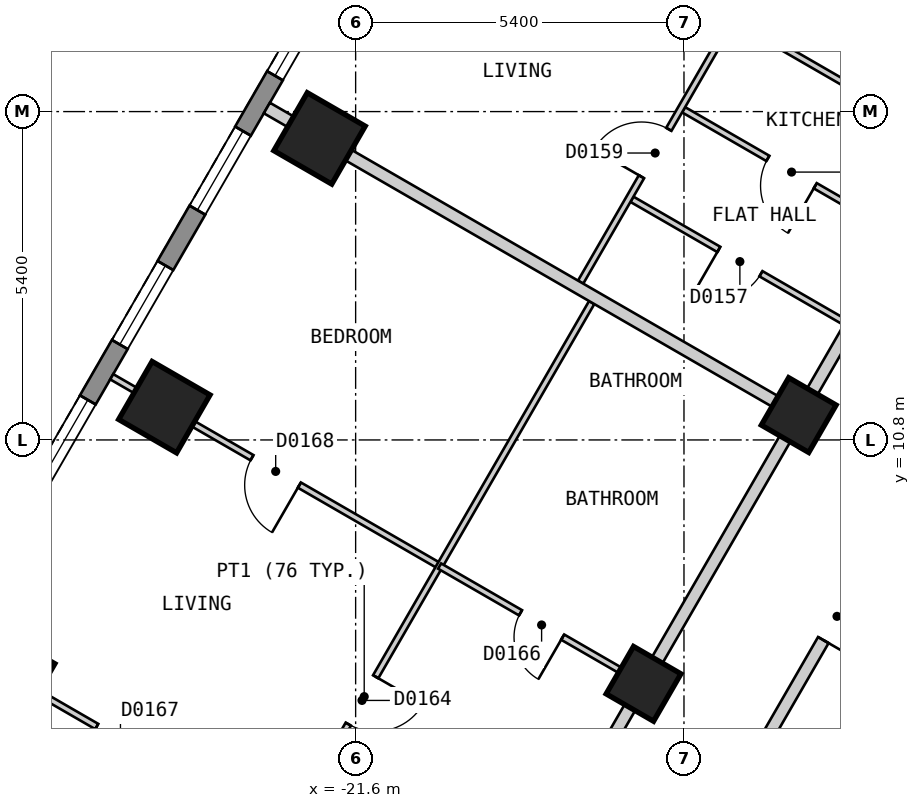
"""IFC4 building model, lengths in metres.
Left out: names, types, materials, properties, quantities, classifications, styles, units other than length and angle.
Written with IfcOpenShell. Run it as: python <this file> out.ifc"""

import sys

from ifc_helpers import new_model, si_unit, direction, frame, frame_2d, origin, origin_2d, place, context, subcontext, project, spatial, polyline, rectangle, outline, extrude, element, fill, save


model = new_model("IFC4")
c1 = context("Model", 3, precision=1e-05, world=origin(), true_north=direction((0.0, 1.0)))
c2 = subcontext(c1, "Body", "Model", "MODEL_VIEW")
j1 = project(units=[si_unit("LENGTHUNIT", "METRE"), si_unit("PLANEANGLEUNIT", "RADIAN")], contexts=[c1])
p1 = place(None, origin())
s1 = spatial("IfcSite", under=j1, at=p1, CompositionType="ELEMENT")
p2 = place(p1, origin())
s2 = spatial("IfcBuilding", under=s1, at=p2, CompositionType="ELEMENT")
p3 = place(p2, frame((0.0, 0.0, 23.4)))
s3 = spatial("IfcBuildingStorey", under=s2, at=p3, CompositionType="ELEMENT", Elevation=23.4)
for number, where, z_axis, x_axis in (
    (1, (-22.194, 15.759, 0.0), (0.0, 0.0, 1.0), (-0.5, -0.866, 0.0)),
    (2, (-24.746, 11.339, 0.0), (0.0, 0.0, 1.0), (-0.5, -0.866, 0.0)),
    (3, (-27.298, 6.919, 0.0), (0.0, 0.0, 1.0), (-0.5, -0.866, 0.0)),
):
    element("IfcColumn", number, at=place(p3, frame(where, z_axis=z_axis, x_axis=x_axis)), inside=s3, PredefinedType="COLUMN", context=c2, shape_type="SweptSolid", body=[
        extrude(rectangle(XDim=1.1, YDim=1.1, at=origin_2d()), origin(), (0.0, 0.0, 1.0), 3.0),
    ])
for number, where, z_axis, x_axis in (
    (4, (-14.313, 11.209, 0.0), (0.0, 0.0, 1.0), (-0.5, -0.866, 0.0)),
    (5, (-16.865, 6.789, 0.0), (0.0, 0.0, 1.0), (-0.5, -0.866, 0.0)),
):
    element("IfcColumn", number, at=place(p3, frame(where, z_axis=z_axis, x_axis=x_axis)), inside=s3, PredefinedType="COLUMN", context=c2, shape_type="SweptSolid", body=[
        extrude(rectangle(XDim=0.9, YDim=0.9, at=origin_2d()), origin(), (0.0, 0.0, 1.0), 3.0),
    ])
p4 = place(p3, frame((-17.71, 25.825, 0.0), z_axis=(0.0, 0.0, 1.0), x_axis=(-0.500001938803, -0.866024284413, 0.0)))
e6 = element("IfcWall", 6, at=p4, inside=s3, PredefinedType="SOLIDWALL", context=c2, shape_type="SweptSolid", body=[
    extrude(outline(polyline([(0.0, -0.15), (27.02, -0.15), (26.94, 0.15), (0.08, 0.15), (0.0, -0.15)])), origin(), (0.0, 0.0, 1.0), 2.7),
])
p5 = place(p4, frame((1.277, 0.0, 0.15)))
e7 = element("IfcOpeningElement", 7, at=p5, cuts=e6, PredefinedType="OPENING", context=c2, shape_type="SweptSolid", body=[
    extrude(rectangle(XDim=1.5, YDim=2.1, at=frame_2d((0.75, 1.05))), frame((0.0, 0.16, 0.0), z_axis=(0.0, -1.0, 0.0), x_axis=(1.0, 0.0, 0.0)), (0.0, 0.0, 1.0), 0.32),
])
p6 = place(p4, frame((3.829, 0.0, 0.15)))
e8 = element("IfcOpeningElement", 8, at=p6, cuts=e6, PredefinedType="OPENING", context=c2, shape_type="SweptSolid", body=[
    extrude(rectangle(XDim=1.5, YDim=2.1, at=frame_2d((0.75, 1.05))), frame((0.0, 0.16, 0.0), z_axis=(0.0, -1.0, 0.0), x_axis=(1.0, 0.0, 0.0)), (0.0, 0.0, 1.0), 0.32),
])
p7 = place(p4, frame((6.382, 0.0, 0.15)))
e9 = element("IfcOpeningElement", 9, at=p7, cuts=e6, PredefinedType="OPENING", context=c2, shape_type="SweptSolid", body=[
    extrude(rectangle(XDim=1.5, YDim=2.1, at=frame_2d((0.75, 1.05))), frame((0.0, 0.16, 0.0), z_axis=(0.0, -1.0, 0.0), x_axis=(1.0, 0.0, 0.0)), (0.0, 0.0, 1.0), 0.32),
])
p8 = place(p4, frame((8.933, 0.0, 0.15)))
e10 = element("IfcOpeningElement", 10, at=p8, cuts=e6, PredefinedType="OPENING", context=c2, shape_type="SweptSolid", body=[
    extrude(rectangle(XDim=1.5, YDim=2.1, at=frame_2d((0.75, 1.05))), frame((0.0, 0.16, 0.0), z_axis=(0.0, -1.0, 0.0), x_axis=(1.0, 0.0, 0.0)), (0.0, 0.0, 1.0), 0.32),
])
p9 = place(p4, frame((11.485, 0.0, 0.15)))
e11 = element("IfcOpeningElement", 11, at=p9, cuts=e6, PredefinedType="OPENING", context=c2, shape_type="SweptSolid", body=[
    extrude(rectangle(XDim=1.5, YDim=2.1, at=frame_2d((0.75, 1.05))), frame((0.0, 0.16, 0.0), z_axis=(0.0, -1.0, 0.0), x_axis=(1.0, 0.0, 0.0)), (0.0, 0.0, 1.0), 0.32),
])
p10 = place(p4, frame((14.037, 0.0, 0.15)))
e12 = element("IfcOpeningElement", 12, at=p10, cuts=e6, PredefinedType="OPENING", context=c2, shape_type="SweptSolid", body=[
    extrude(rectangle(XDim=1.5, YDim=2.1, at=frame_2d((0.75, 1.05))), frame((0.0, 0.16, 0.0), z_axis=(0.0, -1.0, 0.0), x_axis=(1.0, 0.0, 0.0)), (0.0, 0.0, 1.0), 0.32),
])
p11 = place(p4, frame((16.589, 0.0, 0.15)))
e13 = element("IfcOpeningElement", 13, at=p11, cuts=e6, PredefinedType="OPENING", context=c2, shape_type="SweptSolid", body=[
    extrude(rectangle(XDim=1.5, YDim=2.1, at=frame_2d((0.75, 1.05))), frame((0.0, 0.16, 0.0), z_axis=(0.0, -1.0, 0.0), x_axis=(1.0, 0.0, 0.0)), (0.0, 0.0, 1.0), 0.32),
])
p12 = place(p4, frame((19.141, 0.0, 0.15)))
e14 = element("IfcOpeningElement", 14, at=p12, cuts=e6, PredefinedType="OPENING", context=c2, shape_type="SweptSolid", body=[
    extrude(rectangle(XDim=1.5, YDim=2.1, at=frame_2d((0.75, 1.05))), frame((0.0, 0.16, 0.0), z_axis=(0.0, -1.0, 0.0), x_axis=(1.0, 0.0, 0.0)), (0.0, 0.0, 1.0), 0.32),
])
p13 = place(p4, frame((21.693, 0.0, 0.15)))
e15 = element("IfcOpeningElement", 15, at=p13, cuts=e6, PredefinedType="OPENING", context=c2, shape_type="SweptSolid", body=[
    extrude(rectangle(XDim=1.5, YDim=2.1, at=frame_2d((0.75, 1.05))), frame((0.0, 0.16, 0.0), z_axis=(0.0, -1.0, 0.0), x_axis=(1.0, 0.0, 0.0)), (0.0, 0.0, 1.0), 0.32),
])
p14 = place(p4, frame((24.244, 0.0, 0.15)))
e16 = element("IfcOpeningElement", 16, at=p14, cuts=e6, PredefinedType="OPENING", context=c2, shape_type="SweptSolid", body=[
    extrude(rectangle(XDim=1.5, YDim=2.1, at=frame_2d((0.75, 1.05))), frame((0.0, 0.16, 0.0), z_axis=(0.0, -1.0, 0.0), x_axis=(1.0, 0.0, 0.0)), (0.0, 0.0, 1.0), 0.32),
])
p15 = place(p3, frame((-18.244, -0.001, 0.0), z_axis=(0.0, 0.0, 1.0), x_axis=(0.499962999376, 0.866046765051, 0.0)))
e17 = element("IfcWall", 17, at=p15, inside=s3, PredefinedType="PARTITIONING", context=c2, shape_type="SweptSolid", body=[
    extrude(rectangle(XDim=18.245, YDim=0.2, at=frame_2d((9.123, 0.0))), origin(), (0.0, 0.0, 1.0), 2.7),
])
p16 = place(p15, frame((8.672, 0.0, 0.0)))
e18 = element("IfcOpeningElement", 18, at=p16, cuts=e17, PredefinedType="OPENING", context=c2, shape_type="SweptSolid", body=[
    extrude(rectangle(XDim=0.9, YDim=2.1, at=frame_2d((0.45, 1.05))), frame((0.0, 0.11, 0.0), z_axis=(0.0, -1.0, 0.0), x_axis=(1.0, 0.0, 0.0)), (0.0, 0.0, 1.0), 0.22),
])
p17 = place(p3, frame((-20.727, 0.099, 0.0), z_axis=(0.0, 0.0, 1.0), x_axis=(0.499993204491, 0.866029327138, 0.0)))
e19 = element("IfcWall", 19, at=p17, inside=s3, PredefinedType="PARTITIONING", context=c2, shape_type="SweptSolid", body=[
    extrude(rectangle(XDim=20.554, YDim=0.2, at=frame_2d((10.277, 0.0))), origin(), (0.0, 0.0, 1.0), 2.7),
])
p18 = place(p17, frame((14.88, 0.0, 0.0)))
e20 = element("IfcOpeningElement", 20, at=p18, cuts=e19, PredefinedType="OPENING", context=c2, shape_type="SweptSolid", body=[
    extrude(rectangle(XDim=1.0, YDim=2.1, at=frame_2d((0.5, 1.05))), frame((0.0, 0.11, 0.0), z_axis=(0.0, -1.0, 0.0), x_axis=(1.0, 0.0, 0.0)), (0.0, 0.0, 1.0), 0.22),
])
p19 = place(p17, frame((4.673, 0.0, 0.0)))
e21 = element("IfcOpeningElement", 21, at=p19, cuts=e19, PredefinedType="OPENING", context=c2, shape_type="SweptSolid", body=[
    extrude(rectangle(XDim=1.0, YDim=2.1, at=frame_2d((0.5, 1.05))), frame((0.0, 0.11, 0.0), z_axis=(0.0, -1.0, 0.0), x_axis=(1.0, 0.0, 0.0)), (0.0, 0.0, 1.0), 0.22),
])
p20 = place(p3, frame((-28.164, 7.419, 0.0), z_axis=(0.0, 0.0, 1.0), x_axis=(0.86607068519, -0.499921562103, 0.0)))
e22 = element("IfcWall", 22, at=p20, inside=s3, PredefinedType="PARTITIONING", context=c2, shape_type="SweptSolid", body=[
    extrude(rectangle(XDim=6.227, YDim=0.1, at=frame_2d((3.114, 0.0))), origin(), (0.0, 0.0, 1.0), 2.7),
])
p21 = place(p20, frame((2.663, 0.0, 0.0)))
e23 = element("IfcOpeningElement", 23, at=p21, cuts=e22, PredefinedType="OPENING", context=c2, shape_type="SweptSolid", body=[
    extrude(rectangle(XDim=0.9, YDim=2.1, at=frame_2d((0.45, 1.05))), frame((0.0, 0.06, 0.0), z_axis=(0.0, -1.0, 0.0), x_axis=(1.0, 0.0, 0.0)), (0.0, 0.0, 1.0), 0.12),
])
p22 = place(p3, frame((-25.611, 11.839, 0.0), z_axis=(0.0, 0.0, 1.0), x_axis=(0.866031483044, -0.499989470266, 0.0)))
e24 = element("IfcWall", 24, at=p22, inside=s3, PredefinedType="PARTITIONING", context=c2, shape_type="SweptSolid", body=[
    extrude(rectangle(XDim=6.226, YDim=0.1, at=frame_2d((3.113, 0.0))), origin(), (0.0, 0.0, 1.0), 2.7),
])
p23 = place(p22, frame((2.663, 0.0, 0.0)))
e25 = element("IfcOpeningElement", 25, at=p23, cuts=e24, PredefinedType="OPENING", context=c2, shape_type="SweptSolid", body=[
    extrude(rectangle(XDim=0.9, YDim=2.1, at=frame_2d((0.45, 1.05))), frame((0.0, 0.06, 0.0), z_axis=(0.0, -1.0, 0.0), x_axis=(1.0, 0.0, 0.0)), (0.0, 0.0, 1.0), 0.12),
])
p24 = place(p3, frame((-17.056, 14.758, 0.0), z_axis=(0.0, 0.0, 1.0), x_axis=(0.866035025835, -0.499983333749, 0.0)))
e26 = element("IfcWall", 26, at=p24, inside=s3, PredefinedType="PARTITIONING", context=c2, shape_type="SweptSolid", body=[
    extrude(rectangle(XDim=4.051, YDim=0.1, at=frame_2d((2.025, 0.0))), origin(), (0.0, 0.0, 1.0), 2.7),
])
p25 = place(p24, frame((1.65, 0.0, 0.0)))
e27 = element("IfcOpeningElement", 27, at=p25, cuts=e26, PredefinedType="OPENING", context=c2, shape_type="SweptSolid", body=[
    extrude(rectangle(XDim=0.8, YDim=2.1, at=frame_2d((0.4, 1.05))), frame((0.0, 0.06, 0.0), z_axis=(0.0, -1.0, 0.0), x_axis=(1.0, 0.0, 0.0)), (0.0, 0.0, 1.0), 0.12),
])
p26 = place(p3, frame((-16.206, 16.23, 0.0), z_axis=(0.0, 0.0, 1.0), x_axis=(0.866076189179, -0.499912026797, 0.0)))
e28 = element("IfcWall", 28, at=p26, inside=s3, PredefinedType="PARTITIONING", context=c2, shape_type="SweptSolid", body=[
    extrude(rectangle(XDim=4.051, YDim=0.1, at=frame_2d((2.025, 0.0))), origin(), (0.0, 0.0, 1.0), 2.7),
])
p27 = place(p26, frame((1.6, 0.0, 0.0)))
e29 = element("IfcOpeningElement", 29, at=p27, cuts=e28, PredefinedType="OPENING", context=c2, shape_type="SweptSolid", body=[
    extrude(rectangle(XDim=0.9, YDim=2.1, at=frame_2d((0.45, 1.05))), frame((0.0, 0.06, 0.0), z_axis=(0.0, -1.0, 0.0), x_axis=(1.0, 0.0, 0.0)), (0.0, 0.0, 1.0), 0.12),
])
p28 = place(p3, frame((-25.2, 0.099, 0.0), z_axis=(0.0, 0.0, 1.0), x_axis=(0.49997477318, 0.866039968006, 0.0)))
e30 = element("IfcWall", 30, at=p28, inside=s3, PredefinedType="PARTITIONING", context=c2, shape_type="SweptSolid", body=[
    extrude(rectangle(XDim=14.965, YDim=0.1, at=frame_2d((7.482, 0.0))), origin(), (0.0, 0.0, 1.0), 2.7),
])
p29 = place(p28, frame((6.96, 0.0, 0.0)))
e31 = element("IfcOpeningElement", 31, at=p29, cuts=e30, PredefinedType="OPENING", context=c2, shape_type="SweptSolid", body=[
    extrude(rectangle(XDim=0.9, YDim=2.1, at=frame_2d((0.45, 1.05))), frame((0.0, 0.06, 0.0), z_axis=(0.0, -1.0, 0.0), x_axis=(1.0, 0.0, 0.0)), (0.0, 0.0, 1.0), 0.12),
])
p30 = place(p3, frame((-17.9, 13.395, 0.0), z_axis=(0.0, 0.0, 1.0), x_axis=(0.499949632511, 0.866054481515, 0.0)))
e32 = element("IfcWall", 32, at=p30, inside=s3, PredefinedType="PARTITIONING", context=c2, shape_type="SweptSolid", body=[
    extrude(rectangle(XDim=10.109, YDim=0.1, at=frame_2d((5.054, 0.0))), origin(), (0.0, 0.0, 1.0), 2.7),
])
p31 = place(p30, frame((2.002, 0.0, 0.0)))
e33 = element("IfcOpeningElement", 33, at=p31, cuts=e32, PredefinedType="OPENING", context=c2, shape_type="SweptSolid", body=[
    extrude(rectangle(XDim=0.9, YDim=2.1, at=frame_2d((0.45, 1.05))), frame((0.0, 0.06, 0.0), z_axis=(0.0, -1.0, 0.0), x_axis=(1.0, 0.0, 0.0)), (0.0, 0.0, 1.0), 0.12),
])
p32 = place(p30, frame((7.156, 0.0, 0.0)))
e34 = element("IfcOpeningElement", 34, at=p32, cuts=e32, PredefinedType="OPENING", context=c2, shape_type="SweptSolid", body=[
    extrude(rectangle(XDim=0.8, YDim=2.1, at=frame_2d((0.4, 1.05))), frame((0.0, 0.06, 0.0), z_axis=(0.0, -1.0, 0.0), x_axis=(1.0, 0.0, 0.0)), (0.0, 0.0, 1.0), 0.12),
])
p33 = place(p3, frame((-23.06, 16.259, 0.0), z_axis=(0.0, 0.0, 1.0), x_axis=(0.866047370643, -0.499961950354, 0.0)))
e35 = element("IfcWall", 35, at=p33, inside=s3, PredefinedType="PARTITIONING", context=c2, shape_type="SweptSolid", body=[
    extrude(rectangle(XDim=10.001, YDim=0.2, at=frame_2d((5.0, 0.0))), origin(), (0.0, 0.0, 1.0), 2.7),
])
p34 = place(p3, frame((-20.219, 8.726, 0.0), z_axis=(0.0, 0.0, 1.0), x_axis=(0.866008894869, -0.50002859319, 0.0)))
e36 = element("IfcWall", 36, at=p34, inside=s3, PredefinedType="PARTITIONING", context=c2, shape_type="SweptSolid", body=[
    extrude(rectangle(XDim=3.774, YDim=0.1, at=frame_2d((1.887, 0.0))), origin(), (0.0, 0.0, 1.0), 2.7),
])
p35 = place(p34, frame((1.537, 0.0, 0.0)))
e37 = element("IfcOpeningElement", 37, at=p35, cuts=e36, PredefinedType="OPENING", context=c2, shape_type="SweptSolid", body=[
    extrude(rectangle(XDim=0.8, YDim=2.1, at=frame_2d((0.4, 1.05))), frame((0.0, 0.06, 0.0), z_axis=(0.0, -1.0, 0.0), x_axis=(1.0, 0.0, 0.0)), (0.0, 0.0, 1.0), 0.12),
])
p36 = place(p3, frame((-15.398, 17.729, 0.0), z_axis=(0.0, 0.0, 1.0), x_axis=(0.866039832988, -0.499975007054, 0.0)))
e38 = element("IfcWall", 38, at=p36, inside=s3, PredefinedType="PARTITIONING", context=c2, shape_type="SweptSolid", body=[
    extrude(rectangle(XDim=4.1, YDim=0.1, at=frame_2d((2.05, 0.0))), origin(), (0.0, 0.0, 1.0), 2.7),
])
p37 = place(p8, origin())
e39 = element("IfcWindow", 39, at=p37, inside=s3, PartitioningType="SINGLE_PANEL", PredefinedType="WINDOW", context=c2, shape_type="SweptSolid", body=[
    extrude(rectangle(XDim=1.5, YDim=2.1, at=frame_2d((0.75, 1.05))), frame((0.0, 0.03, 0.0), z_axis=(0.0, -1.0, 0.0), x_axis=(1.0, 0.0, 0.0)), (0.0, 0.0, 1.0), 0.06),
])
fill(e10, e39)
p38 = place(p9, origin())
e40 = element("IfcWindow", 40, at=p38, inside=s3, PartitioningType="SINGLE_PANEL", PredefinedType="WINDOW", context=c2, shape_type="SweptSolid", body=[
    extrude(rectangle(XDim=1.5, YDim=2.1, at=frame_2d((0.75, 1.05))), frame((0.0, 0.03, 0.0), z_axis=(0.0, -1.0, 0.0), x_axis=(1.0, 0.0, 0.0)), (0.0, 0.0, 1.0), 0.06),
])
fill(e11, e40)
p39 = place(p10, origin())
e41 = element("IfcWindow", 41, at=p39, inside=s3, PartitioningType="SINGLE_PANEL", PredefinedType="WINDOW", context=c2, shape_type="SweptSolid", body=[
    extrude(rectangle(XDim=1.5, YDim=2.1, at=frame_2d((0.75, 1.05))), frame((0.0, 0.03, 0.0), z_axis=(0.0, -1.0, 0.0), x_axis=(1.0, 0.0, 0.0)), (0.0, 0.0, 1.0), 0.06),
])
fill(e12, e41)
p40 = place(p11, origin())
e42 = element("IfcWindow", 42, at=p40, inside=s3, PartitioningType="SINGLE_PANEL", PredefinedType="WINDOW", context=c2, shape_type="SweptSolid", body=[
    extrude(rectangle(XDim=1.5, YDim=2.1, at=frame_2d((0.75, 1.05))), frame((0.0, 0.03, 0.0), z_axis=(0.0, -1.0, 0.0), x_axis=(1.0, 0.0, 0.0)), (0.0, 0.0, 1.0), 0.06),
])
fill(e13, e42)
p41 = place(p25, origin())
e43 = element("IfcDoor", 43, at=p41, inside=s3, OperationType="SINGLE_SWING_LEFT", PredefinedType="DOOR", context=c2, shape_type="SweptSolid", body=[
    extrude(rectangle(XDim=0.8, YDim=2.1, at=frame_2d((0.4, 1.05))), frame((0.0, 0.025, 0.0), z_axis=(0.0, -1.0, 0.0), x_axis=(1.0, 0.0, 0.0)), (0.0, 0.0, 1.0), 0.05),
])
fill(e27, e43)
p42 = place(p27, origin())
e44 = element("IfcDoor", 44, at=p42, inside=s3, OperationType="SINGLE_SWING_RIGHT", PredefinedType="DOOR", context=c2, shape_type="SweptSolid", body=[
    extrude(rectangle(XDim=0.9, YDim=2.1, at=frame_2d((0.45, 1.05))), frame((0.0, 0.025, 0.0), z_axis=(0.0, -1.0, 0.0), x_axis=(1.0, 0.0, 0.0)), (0.0, 0.0, 1.0), 0.05),
])
fill(e29, e44)
p43 = place(p31, origin())
e45 = element("IfcDoor", 45, at=p43, inside=s3, OperationType="SINGLE_SWING_LEFT", PredefinedType="DOOR", context=c2, shape_type="SweptSolid", body=[
    extrude(rectangle(XDim=0.9, YDim=2.1, at=frame_2d((0.45, 1.05))), frame((0.0, 0.025, 0.0), z_axis=(0.0, -1.0, 0.0), x_axis=(1.0, 0.0, 0.0)), (0.0, 0.0, 1.0), 0.05),
])
fill(e33, e45)
p44 = place(p29, origin())
e46 = element("IfcDoor", 46, at=p44, inside=s3, OperationType="SINGLE_SWING_RIGHT", PredefinedType="DOOR", context=c2, shape_type="SweptSolid", body=[
    extrude(rectangle(XDim=0.9, YDim=2.1, at=frame_2d((0.45, 1.05))), frame((0.0, 0.025, 0.0), z_axis=(0.0, -1.0, 0.0), x_axis=(1.0, 0.0, 0.0)), (0.0, 0.0, 1.0), 0.05),
])
fill(e31, e46)
p45 = place(p35, origin())
e47 = element("IfcDoor", 47, at=p45, inside=s3, OperationType="SINGLE_SWING_RIGHT", PredefinedType="DOOR", context=c2, shape_type="SweptSolid", body=[
    extrude(rectangle(XDim=0.8, YDim=2.1, at=frame_2d((0.4, 1.05))), frame((0.0, 0.025, 0.0), z_axis=(0.0, -1.0, 0.0), x_axis=(1.0, 0.0, 0.0)), (0.0, 0.0, 1.0), 0.05),
])
fill(e37, e47)
p46 = place(p21, origin())
e48 = element("IfcDoor", 48, at=p46, inside=s3, OperationType="SINGLE_SWING_LEFT", PredefinedType="DOOR", context=c2, shape_type="SweptSolid", body=[
    extrude(rectangle(XDim=0.9, YDim=2.1, at=frame_2d((0.45, 1.05))), frame((0.0, 0.025, 0.0), z_axis=(0.0, -1.0, 0.0), x_axis=(1.0, 0.0, 0.0)), (0.0, 0.0, 1.0), 0.05),
])
fill(e23, e48)
p47 = place(p23, origin())
e49 = element("IfcDoor", 49, at=p47, inside=s3, OperationType="SINGLE_SWING_RIGHT", PredefinedType="DOOR", context=c2, shape_type="SweptSolid", body=[
    extrude(rectangle(XDim=0.9, YDim=2.1, at=frame_2d((0.45, 1.05))), frame((0.0, 0.025, 0.0), z_axis=(0.0, -1.0, 0.0), x_axis=(1.0, 0.0, 0.0)), (0.0, 0.0, 1.0), 0.05),
])
fill(e25, e49)
p48 = place(p16, origin())
e50 = element("IfcDoor", 50, at=p48, inside=s3, OperationType="SINGLE_SWING_LEFT", PredefinedType="DOOR", context=c2, shape_type="SweptSolid", body=[
    extrude(rectangle(XDim=0.9, YDim=2.1, at=frame_2d((0.45, 1.05))), frame((0.0, 0.025, 0.0), z_axis=(0.0, -1.0, 0.0), x_axis=(1.0, 0.0, 0.0)), (0.0, 0.0, 1.0), 0.05),
])
fill(e18, e50)
save(model, sys.argv[1])
